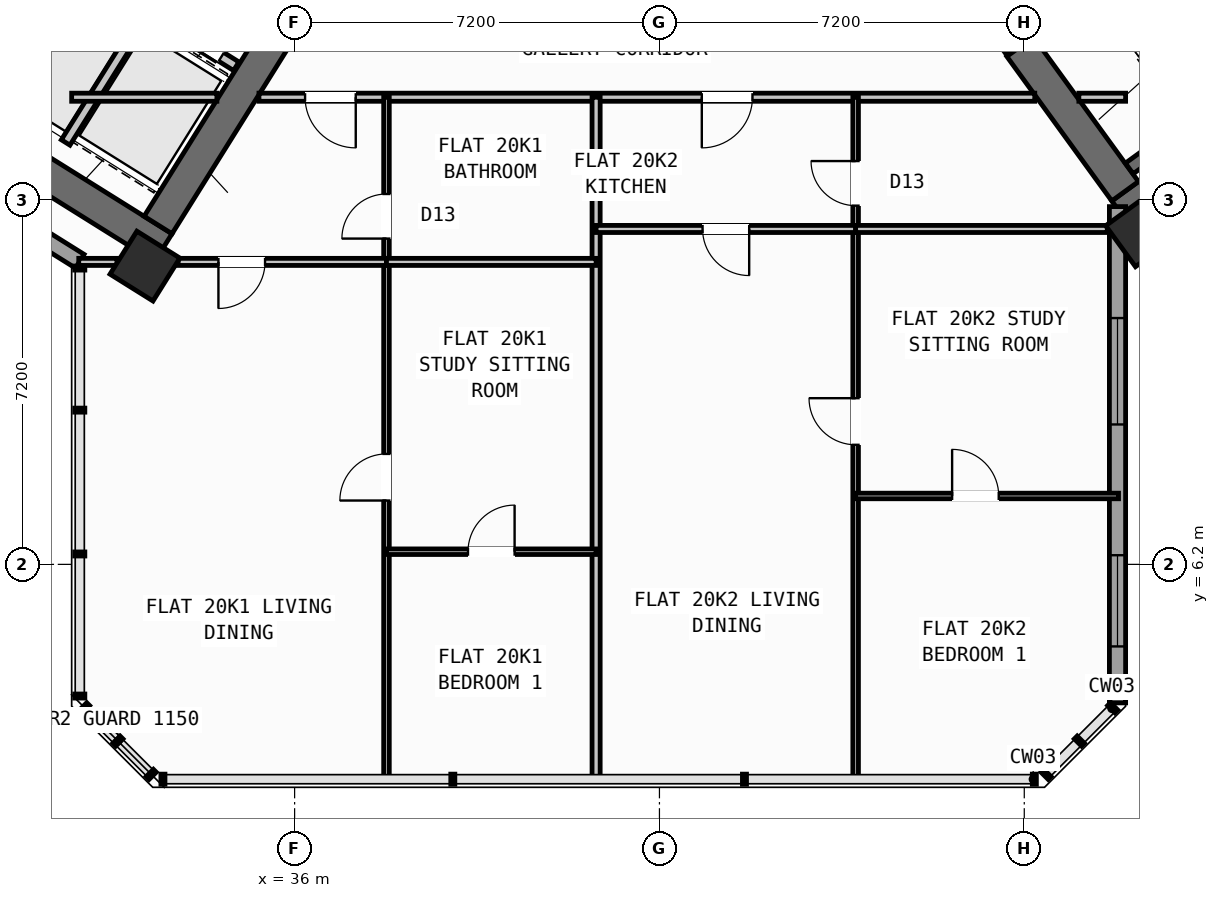
"""IFC4 building model, lengths in metres.
Left out: names, types, materials, properties, quantities, classifications, styles, units other than length and angle.
Written with IfcOpenShell. Run it as: python <this file> out.ifc"""

import sys

from ifc_helpers import new_model, si_unit, direction, frame, frame_2d, origin, origin_2d, place, context, subcontext, project, spatial, rectangle, hollow_rectangle, extrude, source, transform, mapped, element, fill, save


model = new_model("IFC4")
c1 = context("Model", 3, precision=1e-05, world=origin(), true_north=direction((0.0, 1.0)))
c2 = subcontext(c1, "Body", "Model", "MODEL_VIEW")
j1 = project(units=[si_unit("LENGTHUNIT", "METRE"), si_unit("PLANEANGLEUNIT", "RADIAN")], contexts=[c1])
p1 = place(None, origin())
s1 = spatial("IfcSite", under=j1, at=p1, CompositionType="ELEMENT")
p2 = place(p1, origin())
s2 = spatial("IfcBuilding", under=s1, at=p2, CompositionType="ELEMENT")
p3 = place(p2, frame((0.0, 0.0, 81.0)))
s3 = spatial("IfcBuildingStorey", under=s2, at=p3, CompositionType="ELEMENT", Elevation=81.0)
p4 = place(p3, frame((33.409, 12.45, 0.0), z_axis=(0.0, 0.0, 1.0), x_axis=(-0.848051132073, 0.529914405721, 0.0)))
e1 = element("IfcWall", 1, at=p4, inside=s3, PredefinedType="SHEAR", context=c2, shape_type="SweptSolid", body=[
    extrude(rectangle(XDim=13.24, YDim=0.65, at=frame_2d((6.62, 0.0))), origin(), (0.0, 0.0, 1.0), 3.32),
])
p5 = place(p3, frame((36.683, 18.304, 0.0), z_axis=(0.0, 0.0, 1.0), x_axis=(-0.529899109053, -0.848060690178, 0.0)))
e2 = element("IfcWall", 2, at=p5, inside=s3, PredefinedType="SHEAR", context=c2, shape_type="SweptSolid", body=[
    extrude(rectangle(XDim=6.375, YDim=0.65, at=frame_2d((3.188, 0.0))), origin(), (0.0, 0.0, 1.0), 3.32),
])
p6 = place(p3, frame((52.318, 13.11, 0.0), z_axis=(0.0, 0.0, 1.0), x_axis=(0.809019445368, 0.587781878776, 0.0)))
e3 = element("IfcWall", 3, at=p6, inside=s3, PredefinedType="SHEAR", context=c2, shape_type="SweptSolid", body=[
    extrude(rectangle(XDim=12.44, YDim=0.65, at=frame_2d((6.22, 0.0))), origin(), (0.0, 0.0, 1.0), 3.32),
])
p7 = place(p3, frame((52.39, 13.564, 0.0), z_axis=(0.0, 0.0, 1.0), x_axis=(-0.58779688989, 0.809008539037, 0.0)))
e4 = element("IfcWall", 4, at=p7, inside=s3, PredefinedType="SHEAR", context=c2, shape_type="SweptSolid", body=[
    extrude(rectangle(XDim=3.525, YDim=0.65, at=frame_2d((1.763, 0.0))), origin(), (0.0, 0.0, 1.0), 3.32),
])
m1 = source(origin(), c2, "Body", "SweptSolid", [
    extrude(hollow_rectangle(XDim=1.0, YDim=1.0, WallThickness=0.04, at=origin_2d()), origin(), (0.0, 0.0, 1.0), 3.6),
])
for number, where, z_axis, x_axis in (
    (5, (33.046, 12.087, 0.0), (0.0, 0.0, 1.0), (-0.848, 0.53, 0.0)),
    (6, (52.705, 12.773, 0.0), (0.0, 0.0, 1.0), (0.809, 0.588, 0.0)),
):
    element("IfcColumn", number, at=place(p3, frame(where, z_axis=z_axis, x_axis=x_axis)), inside=s3, PredefinedType="COLUMN", context=c2, shape_type="MappedRepresentation", body=[
        mapped(m1, transform((0.0, 0.0, 0.0), scale=1.0)),
    ])
p8 = place(p3, frame((31.76, 12.183, 0.0), z_axis=(0.0, 0.0, 1.0), x_axis=(-0.848047074256, 0.529920899612, 0.0)))
e7 = element("IfcWall", 7, at=p8, inside=s3, PredefinedType="STANDARD", context=c2, shape_type="SweptSolid", body=[
    extrude(rectangle(XDim=30.652, YDim=0.32, at=frame_2d((15.326, 0.0))), origin(), (0.0, 0.0, 1.0), 3.32),
])
p9 = place(p8, frame((14.878, 0.0, 0.0)))
e8 = element("IfcOpeningElement", 8, at=p9, cuts=e7, PredefinedType="OPENING", context=c2, shape_type="SweptSolid", body=[
    extrude(rectangle(XDim=1.2, YDim=2.15, at=frame_2d((0.6, 1.075))), frame((0.0, 0.17, 0.0), z_axis=(0.0, -1.0, 0.0), x_axis=(1.0, 0.0, 0.0)), (0.0, 0.0, 1.0), 0.34),
])
p10 = place(p8, frame((1.99, 0.0, 0.8)))
e9 = element("IfcOpeningElement", 9, at=p10, cuts=e7, PredefinedType="OPENING", context=c2, shape_type="SweptSolid", body=[
    extrude(rectangle(XDim=2.1, YDim=1.55, at=frame_2d((1.05, 0.775))), frame((0.0, 0.17, 0.0), z_axis=(0.0, -1.0, 0.0), x_axis=(1.0, 0.0, 0.0)), (0.0, 0.0, 1.0), 0.34),
])
p11 = place(p8, frame((7.169, 0.0, 0.8)))
e10 = element("IfcOpeningElement", 10, at=p11, cuts=e7, PredefinedType="OPENING", context=c2, shape_type="SweptSolid", body=[
    extrude(rectangle(XDim=2.1, YDim=1.55, at=frame_2d((1.05, 0.775))), frame((0.0, 0.17, 0.0), z_axis=(0.0, -1.0, 0.0), x_axis=(1.0, 0.0, 0.0)), (0.0, 0.0, 1.0), 0.34),
])
p12 = place(p8, frame((21.289, 0.0, 0.85)))
e11 = element("IfcOpeningElement", 11, at=p12, cuts=e7, PredefinedType="OPENING", context=c2, shape_type="SweptSolid", body=[
    extrude(rectangle(XDim=1.5, YDim=1.5, at=frame_2d((0.75, 0.75))), frame((0.0, 0.17, 0.0), z_axis=(0.0, -1.0, 0.0), x_axis=(1.0, 0.0, 0.0)), (0.0, 0.0, 1.0), 0.34),
])
p13 = place(p8, frame((25.59, 0.0, 1.0)))
e12 = element("IfcOpeningElement", 12, at=p13, cuts=e7, PredefinedType="OPENING", context=c2, shape_type="SweptSolid", body=[
    extrude(rectangle(XDim=0.9, YDim=1.25, at=frame_2d((0.45, 0.625))), frame((0.0, 0.17, 0.0), z_axis=(0.0, -1.0, 0.0), x_axis=(1.0, 0.0, 0.0)), (0.0, 0.0, 1.0), 0.34),
])
p14 = place(p8, frame((28.47, 0.0, 1.0)))
e13 = element("IfcOpeningElement", 13, at=p14, cuts=e7, PredefinedType="OPENING", context=c2, shape_type="SweptSolid", body=[
    extrude(rectangle(XDim=0.9, YDim=1.25, at=frame_2d((0.45, 0.625))), frame((0.0, 0.17, 0.0), z_axis=(0.0, -1.0, 0.0), x_axis=(1.0, 0.0, 0.0)), (0.0, 0.0, 1.0), 0.34),
])
p15 = place(p3, frame((52.24, 13.261, 0.0), z_axis=(0.0, 0.0, 1.0), x_axis=(0.0, -1.0, 0.0)))
e14 = element("IfcWall", 14, at=p15, inside=s3, PredefinedType="STANDARD", context=c2, shape_type="SweptSolid", body=[
    extrude(rectangle(XDim=9.795, YDim=0.32, at=frame_2d((4.897, 0.0))), origin(), (0.0, 0.0, 1.0), 3.32),
])
p16 = place(p15, frame((2.199, 0.0, 0.8)))
e15 = element("IfcOpeningElement", 15, at=p16, cuts=e14, PredefinedType="OPENING", context=c2, shape_type="SweptSolid", body=[
    extrude(rectangle(XDim=2.1, YDim=1.55, at=frame_2d((1.05, 0.775))), frame((0.0, 0.17, 0.0), z_axis=(0.0, -1.0, 0.0), x_axis=(1.0, 0.0, 0.0)), (0.0, 0.0, 1.0), 0.34),
])
p17 = place(p15, frame((6.88, 0.0, 0.85)))
e16 = element("IfcOpeningElement", 16, at=p17, cuts=e14, PredefinedType="OPENING", context=c2, shape_type="SweptSolid", body=[
    extrude(rectangle(XDim=1.8, YDim=1.5, at=frame_2d((0.9, 0.75))), frame((0.0, 0.17, 0.0), z_axis=(0.0, -1.0, 0.0), x_axis=(1.0, 0.0, 0.0)), (0.0, 0.0, 1.0), 0.34),
])
p18 = place(p3, frame((31.288, 18.256, 0.0), z_axis=(0.0, 0.0, 1.0), x_axis=(-0.529943379326, -0.848033026897, 0.0)))
e17 = element("IfcWall", 17, at=p18, inside=s3, PredefinedType="SHEAR", context=c2, shape_type="SweptSolid", body=[
    extrude(rectangle(XDim=3.16, YDim=0.26, at=frame_2d((1.58, 0.0))), origin(), (0.0, 0.0, 1.0), 3.32),
])
p19 = place(p3, frame((34.848, 16.031, 0.0), z_axis=(0.0, 0.0, 1.0), x_axis=(-0.848044042236, 0.529925751807, 0.0)))
e18 = element("IfcWall", 18, at=p19, inside=s3, PredefinedType="STANDARD", context=c2, shape_type="SweptSolid", body=[
    extrude(rectangle(XDim=4.198, YDim=0.2, at=frame_2d((2.099, 0.0))), origin(), (0.0, 0.0, 1.0), 3.31),
])
p20 = place(p19, frame((0.348, 0.0, 0.0)))
e19 = element("IfcOpeningElement", 19, at=p20, cuts=e18, PredefinedType="OPENING", context=c2, shape_type="SweptSolid", body=[
    extrude(rectangle(XDim=1.3, YDim=2.2, at=frame_2d((0.65, 1.1))), frame((0.0, 0.11, 0.0), z_axis=(0.0, -1.0, 0.0), x_axis=(1.0, 0.0, 0.0)), (0.0, 0.0, 1.0), 0.22),
])
p21 = place(p19, frame((2.423, 0.0, 0.0)))
e20 = element("IfcOpeningElement", 20, at=p21, cuts=e18, PredefinedType="OPENING", context=c2, shape_type="SweptSolid", body=[
    extrude(rectangle(XDim=1.45, YDim=2.25, at=frame_2d((0.725, 1.125))), frame((0.0, 0.11, 0.0), z_axis=(0.0, -1.0, 0.0), x_axis=(1.0, 0.0, 0.0)), (0.0, 0.0, 1.0), 0.22),
])
p22 = place(p3, frame((33.029, 17.003, 0.0), z_axis=(0.0, 0.0, 1.0), x_axis=(-0.529916267533, -0.848049968695, 0.0)))
e21 = element("IfcWall", 21, at=p22, inside=s3, PredefinedType="STANDARD", context=c2, shape_type="SweptSolid", body=[
    extrude(rectangle(XDim=2.92, YDim=0.2, at=frame_2d((1.46, 0.0))), origin(), (0.0, 0.0, 1.0), 3.31),
])
p23 = place(p3, frame((52.472, 14.013, 0.0), z_axis=(0.0, 0.0, 1.0), x_axis=(0.809028366311, 0.587769599847, 0.0)))
e22 = element("IfcWall", 22, at=p23, inside=s3, PredefinedType="SHEAR", context=c2, shape_type="SweptSolid", body=[
    extrude(rectangle(XDim=7.33, YDim=0.26, at=frame_2d((3.665, 0.0))), origin(), (0.0, 0.0, 1.0), 3.32),
])
p24 = place(p3, frame((31.6, 15.42, 0.0), z_axis=(0.0, 0.0, 1.0), x_axis=(1.0, 0.0, 0.0)))
e23 = element("IfcWall", 23, at=p24, inside=s3, PredefinedType="PARTITIONING", context=c2, shape_type="SweptSolid", body=[
    extrude(rectangle(XDim=2.866, YDim=0.16, at=frame_2d((1.433, 0.0))), origin(), (0.0, 0.0, 1.0), 3.31),
])
p25 = place(p3, frame((35.296, 15.42, 0.0), z_axis=(0.0, 0.0, 1.0), x_axis=(1.0, 0.0, 0.0)))
e24 = element("IfcWall", 24, at=p25, inside=s3, PredefinedType="PARTITIONING", context=c2, shape_type="SweptSolid", body=[
    extrude(rectangle(XDim=15.311, YDim=0.16, at=frame_2d((7.655, 0.0))), origin(), (0.0, 0.0, 1.0), 3.31),
])
p26 = place(p25, frame((0.91, 0.0, 0.0)))
e25 = element("IfcOpeningElement", 25, at=p26, cuts=e24, PredefinedType="OPENING", context=c2, shape_type="SweptSolid", body=[
    extrude(rectangle(XDim=1.0, YDim=2.1, at=frame_2d((0.5, 1.05))), frame((0.0, 0.09, 0.0), z_axis=(0.0, -1.0, 0.0), x_axis=(1.0, 0.0, 0.0)), (0.0, 0.0, 1.0), 0.18),
])
p27 = place(p25, frame((8.74, 0.0, 0.0)))
e26 = element("IfcOpeningElement", 26, at=p27, cuts=e24, PredefinedType="OPENING", context=c2, shape_type="SweptSolid", body=[
    extrude(rectangle(XDim=1.0, YDim=2.1, at=frame_2d((0.5, 1.05))), frame((0.0, 0.09, 0.0), z_axis=(0.0, -1.0, 0.0), x_axis=(1.0, 0.0, 0.0)), (0.0, 0.0, 1.0), 0.18),
])
p28 = place(p3, frame((51.477, 15.42, 0.0), z_axis=(0.0, 0.0, 1.0), x_axis=(1.0, 0.0, 0.0)))
e27 = element("IfcWall", 27, at=p28, inside=s3, PredefinedType="PARTITIONING", context=c2, shape_type="SweptSolid", body=[
    extrude(rectangle(XDim=0.923, YDim=0.16, at=frame_2d((0.461, 0.0))), origin(), (0.0, 0.0, 1.0), 3.31),
])
p29 = place(p3, frame((50.119, 16.333, 0.0), z_axis=(0.0, 0.0, 1.0), x_axis=(-0.587749856981, 0.809042709391, 0.0)))
e28 = element("IfcWall", 28, at=p29, inside=s3, PredefinedType="STANDARD", context=c2, shape_type="SweptSolid", body=[
    extrude(rectangle(XDim=2.96, YDim=0.2, at=frame_2d((1.48, 0.0))), origin(), (0.0, 0.0, 1.0), 3.31),
])
p30 = place(p29, frame((0.53, 0.0, 0.0)))
e29 = element("IfcOpeningElement", 29, at=p30, cuts=e28, PredefinedType="OPENING", context=c2, shape_type="SweptSolid", body=[
    extrude(rectangle(XDim=1.5, YDim=2.15, at=frame_2d((0.75, 1.075))), frame((0.0, 0.11, 0.0), z_axis=(0.0, -1.0, 0.0), x_axis=(1.0, 0.0, 0.0)), (0.0, 0.0, 1.0), 0.22),
])
p31 = place(p3, frame((41.95, 1.96, 0.0), z_axis=(0.0, 0.0, 1.0), x_axis=(0.0, 1.0, 0.0)))
e30 = element("IfcWall", 30, at=p31, inside=s3, PredefinedType="PARTITIONING", context=c2, shape_type="SweptSolid", body=[
    extrude(rectangle(XDim=13.46, YDim=0.16, at=frame_2d((6.73, 0.0))), origin(), (0.0, 0.0, 1.0), 3.31),
])
p32 = place(p3, frame((37.813, 1.96, 0.0), z_axis=(0.0, 0.0, 1.0), x_axis=(0.0, 1.0, 0.0)))
e31 = element("IfcWall", 31, at=p32, inside=s3, PredefinedType="PARTITIONING", context=c2, shape_type="SweptSolid", body=[
    extrude(rectangle(XDim=13.46, YDim=0.11, at=frame_2d((6.73, 0.0))), origin(), (0.0, 0.0, 1.0), 3.31),
])
p33 = place(p32, frame((5.5, 0.0, 0.0)))
e32 = element("IfcOpeningElement", 32, at=p33, cuts=e31, PredefinedType="OPENING", context=c2, shape_type="SweptSolid", body=[
    extrude(rectangle(XDim=0.92, YDim=2.08, at=frame_2d((0.46, 1.04))), frame((0.0, 0.065, 0.0), z_axis=(0.0, -1.0, 0.0), x_axis=(1.0, 0.0, 0.0)), (0.0, 0.0, 1.0), 0.13),
])
p34 = place(p32, frame((10.67, 0.0, 0.0)))
e33 = element("IfcOpeningElement", 33, at=p34, cuts=e31, PredefinedType="OPENING", context=c2, shape_type="SweptSolid", body=[
    extrude(rectangle(XDim=0.88, YDim=2.08, at=frame_2d((0.44, 1.04))), frame((0.0, 0.065, 0.0), z_axis=(0.0, -1.0, 0.0), x_axis=(1.0, 0.0, 0.0)), (0.0, 0.0, 1.0), 0.13),
])
p35 = place(p3, frame((31.74, 12.17, 0.0), z_axis=(0.0, 0.0, 1.0), x_axis=(1.0, 0.0, 0.0)))
e34 = element("IfcWall", 34, at=p35, inside=s3, PredefinedType="PLUMBINGWALL", context=c2, shape_type="SweptSolid", body=[
    extrude(rectangle(XDim=0.754, YDim=0.14, at=frame_2d((0.377, 0.0))), origin(), (0.0, 0.0, 1.0), 3.31),
])
p36 = place(p3, frame((33.702, 12.17, 0.0), z_axis=(0.0, 0.0, 1.0), x_axis=(1.0, 0.0, 0.0)))
e35 = element("IfcWall", 35, at=p36, inside=s3, PredefinedType="PLUMBINGWALL", context=c2, shape_type="SweptSolid", body=[
    extrude(rectangle(XDim=4.111, YDim=0.14, at=frame_2d((2.056, 0.0))), origin(), (0.0, 0.0, 1.0), 2.495),
])
p37 = place(p36, frame((0.795, 0.0, 0.0)))
e36 = element("IfcOpeningElement", 36, at=p37, cuts=e35, PredefinedType="OPENING", context=c2, shape_type="SweptSolid", body=[
    extrude(rectangle(XDim=0.92, YDim=2.08, at=frame_2d((0.46, 1.04))), frame((0.0, 0.08, 0.0), z_axis=(0.0, -1.0, 0.0), x_axis=(1.0, 0.0, 0.0)), (0.0, 0.0, 1.0), 0.16),
])
p38 = place(p3, frame((37.813, 12.17, 0.0), z_axis=(0.0, 0.0, 1.0), x_axis=(1.0, 0.0, 0.0)))
e37 = element("IfcWall", 37, at=p38, inside=s3, PredefinedType="PLUMBINGWALL", context=c2, shape_type="SweptSolid", body=[
    extrude(rectangle(XDim=4.137, YDim=0.14, at=frame_2d((2.068, 0.0))), origin(), (0.0, 0.0, 1.0), 2.495),
])
p39 = place(p3, frame((37.813, 6.45, 0.0), z_axis=(0.0, 0.0, 1.0), x_axis=(1.0, 0.0, 0.0)))
e38 = element("IfcWall", 38, at=p39, inside=s3, PredefinedType="PARTITIONING", context=c2, shape_type="SweptSolid", body=[
    extrude(rectangle(XDim=4.137, YDim=0.11, at=frame_2d((2.068, 0.0))), origin(), (0.0, 0.0, 1.0), 3.31),
])
p40 = place(p39, frame((1.608, 0.0, 0.0)))
e39 = element("IfcOpeningElement", 39, at=p40, cuts=e38, PredefinedType="OPENING", context=c2, shape_type="SweptSolid", body=[
    extrude(rectangle(XDim=0.92, YDim=2.08, at=frame_2d((0.46, 1.04))), frame((0.0, 0.065, 0.0), z_axis=(0.0, -1.0, 0.0), x_axis=(1.0, 0.0, 0.0)), (0.0, 0.0, 1.0), 0.13),
])
p41 = place(p3, frame((47.072, 1.96, 0.0), z_axis=(0.0, 0.0, 1.0), x_axis=(0.0, 1.0, 0.0)))
e40 = element("IfcWall", 40, at=p41, inside=s3, PredefinedType="PARTITIONING", context=c2, shape_type="SweptSolid", body=[
    extrude(rectangle(XDim=13.46, YDim=0.11, at=frame_2d((6.73, 0.0))), origin(), (0.0, 0.0, 1.0), 3.31),
])
p42 = place(p41, frame((6.6, 0.0, 0.0)))
e41 = element("IfcOpeningElement", 41, at=p42, cuts=e40, PredefinedType="OPENING", context=c2, shape_type="SweptSolid", body=[
    extrude(rectangle(XDim=0.92, YDim=2.08, at=frame_2d((0.46, 1.04))), frame((0.0, 0.065, 0.0), z_axis=(0.0, -1.0, 0.0), x_axis=(1.0, 0.0, 0.0)), (0.0, 0.0, 1.0), 0.13),
])
p43 = place(p41, frame((11.32, 0.0, 0.0)))
e42 = element("IfcOpeningElement", 42, at=p43, cuts=e40, PredefinedType="OPENING", context=c2, shape_type="SweptSolid", body=[
    extrude(rectangle(XDim=0.88, YDim=2.08, at=frame_2d((0.44, 1.04))), frame((0.0, 0.065, 0.0), z_axis=(0.0, -1.0, 0.0), x_axis=(1.0, 0.0, 0.0)), (0.0, 0.0, 1.0), 0.13),
])
p44 = place(p3, frame((41.95, 12.82, 0.0), z_axis=(0.0, 0.0, 1.0), x_axis=(1.0, 0.0, 0.0)))
e43 = element("IfcWall", 43, at=p44, inside=s3, PredefinedType="PLUMBINGWALL", context=c2, shape_type="SweptSolid", body=[
    extrude(rectangle(XDim=5.122, YDim=0.14, at=frame_2d((2.561, 0.0))), origin(), (0.0, 0.0, 1.0), 2.495),
])
p45 = place(p44, frame((2.101, 0.0, 0.0)))
e44 = element("IfcOpeningElement", 44, at=p45, cuts=e43, PredefinedType="OPENING", context=c2, shape_type="SweptSolid", body=[
    extrude(rectangle(XDim=0.92, YDim=2.08, at=frame_2d((0.46, 1.04))), frame((0.0, 0.08, 0.0), z_axis=(0.0, -1.0, 0.0), x_axis=(1.0, 0.0, 0.0)), (0.0, 0.0, 1.0), 0.16),
])
p46 = place(p3, frame((47.072, 12.82, 0.0), z_axis=(0.0, 0.0, 1.0), x_axis=(1.0, 0.0, 0.0)))
e45 = element("IfcWall", 45, at=p46, inside=s3, PredefinedType="PLUMBINGWALL", context=c2, shape_type="SweptSolid", body=[
    extrude(rectangle(XDim=4.967, YDim=0.14, at=frame_2d((2.483, 0.0))), origin(), (0.0, 0.0, 1.0), 2.495),
])
p47 = place(p3, frame((47.072, 7.55, 0.0), z_axis=(0.0, 0.0, 1.0), x_axis=(1.0, 0.0, 0.0)))
e46 = element("IfcWall", 46, at=p47, inside=s3, PredefinedType="PARTITIONING", context=c2, shape_type="SweptSolid", body=[
    extrude(rectangle(XDim=5.188, YDim=0.11, at=frame_2d((2.594, 0.0))), origin(), (0.0, 0.0, 1.0), 3.31),
])
p48 = place(p47, frame((1.904, 0.0, 0.0)))
e47 = element("IfcOpeningElement", 47, at=p48, cuts=e46, PredefinedType="OPENING", context=c2, shape_type="SweptSolid", body=[
    extrude(rectangle(XDim=0.92, YDim=2.08, at=frame_2d((0.46, 1.04))), frame((0.0, 0.065, 0.0), z_axis=(0.0, -1.0, 0.0), x_axis=(1.0, 0.0, 0.0)), (0.0, 0.0, 1.0), 0.13),
])
m2 = source(origin(), c2, "Body", "SweptSolid", [
    extrude(rectangle(XDim=2.1, YDim=1.55, at=frame_2d((1.05, 0.775))), frame((0.0, 0.03, 0.0), z_axis=(0.0, -1.0, 0.0), x_axis=(1.0, 0.0, 0.0)), (0.0, 0.0, 1.0), 0.06),
])
p49 = place(p16, origin())
e48 = element("IfcWindow", 48, at=p49, inside=s3, PartitioningType="SINGLE_PANEL", PredefinedType="WINDOW", context=c2, shape_type="MappedRepresentation", body=[
    mapped(m2, transform((0.0, 0.0, 0.0), scale=1.0)),
])
fill(e15, e48)
m3 = source(origin(), c2, "Body", "SweptSolid", [
    extrude(rectangle(XDim=1.8, YDim=1.5, at=frame_2d((0.9, 0.75))), frame((0.0, 0.03, 0.0), z_axis=(0.0, -1.0, 0.0), x_axis=(1.0, 0.0, 0.0)), (0.0, 0.0, 1.0), 0.06),
])
p50 = place(p17, origin())
e49 = element("IfcWindow", 49, at=p50, inside=s3, PartitioningType="SINGLE_PANEL", PredefinedType="WINDOW", context=c2, shape_type="MappedRepresentation", body=[
    mapped(m3, transform((0.0, 0.0, 0.0), scale=1.0)),
])
fill(e16, e49)
m4 = source(origin(), c2, "Body", "SweptSolid", [
    extrude(rectangle(XDim=1.3, YDim=2.2, at=frame_2d((0.65, 1.1))), frame((0.0, 0.025, 0.0), z_axis=(0.0, -1.0, 0.0), x_axis=(1.0, 0.0, 0.0)), (0.0, 0.0, 1.0), 0.05),
])
p51 = place(p20, origin())
e50 = element("IfcDoor", 50, at=p51, inside=s3, OperationType="DOUBLE_DOOR_SLIDING", PredefinedType="DOOR", context=c2, shape_type="MappedRepresentation", body=[
    mapped(m4, transform((0.0, 0.0, 0.0), scale=1.0)),
])
fill(e19, e50)
m5 = source(origin(), c2, "Body", "SweptSolid", [
    extrude(rectangle(XDim=0.92, YDim=2.08, at=frame_2d((0.46, 1.04))), frame((0.0, 0.025, 0.0), z_axis=(0.0, -1.0, 0.0), x_axis=(1.0, 0.0, 0.0)), (0.0, 0.0, 1.0), 0.05),
])
p52 = place(p33, origin())
e51 = element("IfcDoor", 51, at=p52, inside=s3, OperationType="SINGLE_SWING_LEFT", PredefinedType="DOOR", context=c2, shape_type="MappedRepresentation", body=[
    mapped(m5, transform((0.0, 0.0, 0.0), scale=1.0)),
])
fill(e32, e51)
p53 = place(p40, origin())
e52 = element("IfcDoor", 52, at=p53, inside=s3, OperationType="SINGLE_SWING_RIGHT", PredefinedType="DOOR", context=c2, shape_type="MappedRepresentation", body=[
    mapped(m5, transform((0.0, 0.0, 0.0), scale=1.0)),
])
fill(e39, e52)
m6 = source(origin(), c2, "Body", "SweptSolid", [
    extrude(rectangle(XDim=1.0, YDim=2.1, at=frame_2d((0.5, 1.05))), frame((0.0, 0.025, 0.0), z_axis=(0.0, -1.0, 0.0), x_axis=(1.0, 0.0, 0.0)), (0.0, 0.0, 1.0), 0.05),
])
p54 = place(p26, frame((1.0, 0.0, 0.0), z_axis=(0.0, 0.0, 1.0), x_axis=(-1.0, 0.0, 0.0)))
e53 = element("IfcDoor", 53, at=p54, inside=s3, OperationType="SINGLE_SWING_LEFT", PredefinedType="DOOR", context=c2, shape_type="MappedRepresentation", body=[
    mapped(m6, transform((0.0, 0.0, 0.0), scale=1.0)),
])
fill(e25, e53)
p55 = place(p37, frame((0.92, 0.0, 0.0), z_axis=(0.0, 0.0, 1.0), x_axis=(-1.0, 0.0, 0.0)))
e54 = element("IfcDoor", 54, at=p55, inside=s3, OperationType="SINGLE_SWING_RIGHT", PredefinedType="DOOR", context=c2, shape_type="MappedRepresentation", body=[
    mapped(m5, transform((0.0, 0.0, 0.0), scale=1.0)),
])
fill(e36, e54)
m7 = source(origin(), c2, "Body", "SweptSolid", [
    extrude(rectangle(XDim=0.88, YDim=2.08, at=frame_2d((0.44, 1.04))), frame((0.0, 0.025, 0.0), z_axis=(0.0, -1.0, 0.0), x_axis=(1.0, 0.0, 0.0)), (0.0, 0.0, 1.0), 0.05),
])
p56 = place(p34, origin())
e55 = element("IfcDoor", 55, at=p56, inside=s3, OperationType="SINGLE_SWING_LEFT", PredefinedType="DOOR", context=c2, shape_type="MappedRepresentation", body=[
    mapped(m7, transform((0.0, 0.0, 0.0), scale=1.0)),
])
fill(e33, e55)
p57 = place(p42, origin())
e56 = element("IfcDoor", 56, at=p57, inside=s3, OperationType="SINGLE_SWING_RIGHT", PredefinedType="DOOR", context=c2, shape_type="MappedRepresentation", body=[
    mapped(m5, transform((0.0, 0.0, 0.0), scale=1.0)),
])
fill(e41, e56)
p58 = place(p48, origin())
e57 = element("IfcDoor", 57, at=p58, inside=s3, OperationType="SINGLE_SWING_LEFT", PredefinedType="DOOR", context=c2, shape_type="MappedRepresentation", body=[
    mapped(m5, transform((0.0, 0.0, 0.0), scale=1.0)),
])
fill(e47, e57)
p59 = place(p27, frame((1.0, 0.0, 0.0), z_axis=(0.0, 0.0, 1.0), x_axis=(-1.0, 0.0, 0.0)))
e58 = element("IfcDoor", 58, at=p59, inside=s3, OperationType="SINGLE_SWING_RIGHT", PredefinedType="DOOR", context=c2, shape_type="MappedRepresentation", body=[
    mapped(m6, transform((0.0, 0.0, 0.0), scale=1.0)),
])
fill(e26, e58)
p60 = place(p45, frame((0.92, 0.0, 0.0), z_axis=(0.0, 0.0, 1.0), x_axis=(-1.0, 0.0, 0.0)))
e59 = element("IfcDoor", 59, at=p60, inside=s3, OperationType="SINGLE_SWING_LEFT", PredefinedType="DOOR", context=c2, shape_type="MappedRepresentation", body=[
    mapped(m5, transform((0.0, 0.0, 0.0), scale=1.0)),
])
fill(e44, e59)
p61 = place(p43, origin())
e60 = element("IfcDoor", 60, at=p61, inside=s3, OperationType="SINGLE_SWING_RIGHT", PredefinedType="DOOR", context=c2, shape_type="MappedRepresentation", body=[
    mapped(m7, transform((0.0, 0.0, 0.0), scale=1.0)),
])
fill(e42, e60)
save(model, sys.argv[1])
